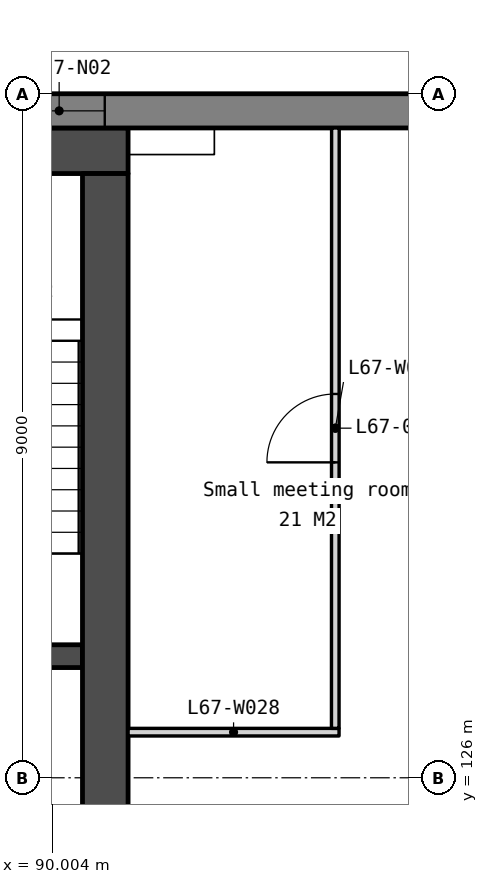
"""IFC4 building model, lengths in metres.
Left out: names, types, materials, properties, quantities, classifications, styles, units other than length and angle.
Written with IfcOpenShell. Run it as: python <this file> out.ifc"""

import sys

from ifc_helpers import new_model, si_unit, direction, frame, frame_2d, origin, place, context, subcontext, project, spatial, polyline, rectangle, outline, extrude, element, fill, save


model = new_model("IFC4")
c1 = context("Model", 3, precision=1e-05, world=origin(), true_north=direction((0.0, 1.0)))
c2 = subcontext(c1, "Body", "Model", "MODEL_VIEW")
j1 = project(units=[si_unit("LENGTHUNIT", "METRE"), si_unit("PLANEANGLEUNIT", "RADIAN")], contexts=[c1])
p1 = place(None, origin())
s1 = spatial("IfcSite", under=j1, at=p1, CompositionType="ELEMENT")
p2 = place(p1, origin())
s2 = spatial("IfcBuilding", under=s1, at=p2, CompositionType="ELEMENT")
p3 = place(p2, frame((0.0, 0.0, 273.8)))
s3 = spatial("IfcBuildingStorey", under=s2, at=p3, CompositionType="ELEMENT", Elevation=273.8)
p4 = place(p3, frame((69.0, 134.25, 0.0), z_axis=(0.0, 0.0, 1.0), x_axis=(1.0, 0.0, 0.0)))
e1 = element("IfcWall", 1, at=p4, inside=s3, PredefinedType="SOLIDWALL", context=c2, shape_type="SweptSolid", body=[
    extrude(rectangle(XDim=22.0, YDim=0.6, at=frame_2d((11.0, 0.0))), origin(), (0.0, 0.0, 1.0), 3.75),
])
p5 = place(p3, frame((87.85, 127.6, 0.0), z_axis=(0.0, 0.0, 1.0), x_axis=(1.0, 0.0, 0.0)))
e2 = element("IfcWall", 2, at=p5, inside=s3, PredefinedType="SOLIDWALL", context=c2, shape_type="SweptSolid", body=[
    extrude(rectangle(XDim=2.55, YDim=0.3, at=frame_2d((1.275, 0.0))), origin(), (0.0, 0.0, 1.0), 3.75),
])
p6 = place(p3, frame((90.7, 133.95, 0.0), z_axis=(0.0, 0.0, 1.0), x_axis=(0.0, -1.0, 0.0)))
e3 = element("IfcWall", 3, at=p6, inside=s3, PredefinedType="SOLIDWALL", context=c2, shape_type="SweptSolid", body=[
    extrude(rectangle(XDim=10.8, YDim=0.6, at=frame_2d((5.4, 0.0))), origin(), (0.0, 0.0, 1.0), 3.75),
])
p7 = place(p3, frame((98.486, 134.775, -0.15), z_axis=(0.0, 0.0, 1.0), x_axis=(-1.0, 0.0, 0.0)))
e4 = element("IfcWall", 4, at=p7, inside=s3, PredefinedType="SOLIDWALL", context=c2, shape_type="SweptSolid", body=[
    extrude(outline(polyline([(36.972, 0.0), (36.972, 3.9), (0.0, 3.9), (0.0, 0.0), (36.972, 0.0)])), frame((0.0, 0.225, 0.0), z_axis=(0.0, -1.0, 0.0), x_axis=(1.0, 0.0, 0.0)), (0.0, 0.0, 1.0), 0.45),
])
p8 = place(p7, frame((0.715, 0.0, 0.95)))
e5 = element("IfcOpeningElement", 5, at=p8, cuts=e4, PredefinedType="OPENING", context=c2, shape_type="SweptSolid", body=[
    extrude(rectangle(XDim=1.2, YDim=2.2, at=frame_2d((0.6, 1.1))), frame((0.0, 0.235, 0.0), z_axis=(0.0, -1.0, 0.0), x_axis=(1.0, 0.0, 0.0)), (0.0, 0.0, 1.0), 0.47),
])
p9 = place(p7, frame((7.793, 0.0, 0.95)))
e6 = element("IfcOpeningElement", 6, at=p9, cuts=e4, PredefinedType="OPENING", context=c2, shape_type="SweptSolid", body=[
    extrude(rectangle(XDim=1.2, YDim=2.2, at=frame_2d((0.6, 1.1))), frame((0.0, 0.235, 0.0), z_axis=(0.0, -1.0, 0.0), x_axis=(1.0, 0.0, 0.0)), (0.0, 0.0, 1.0), 0.47),
])
p10 = place(p7, frame((9.493, 0.0, 0.95)))
e7 = element("IfcOpeningElement", 7, at=p10, cuts=e4, PredefinedType="OPENING", context=c2, shape_type="SweptSolid", body=[
    extrude(rectangle(XDim=1.2, YDim=2.2, at=frame_2d((0.6, 1.1))), frame((0.0, 0.235, 0.0), z_axis=(0.0, -1.0, 0.0), x_axis=(1.0, 0.0, 0.0)), (0.0, 0.0, 1.0), 0.47),
])
p11 = place(p7, frame((17.036, 0.0, 0.95)))
e8 = element("IfcOpeningElement", 8, at=p11, cuts=e4, PredefinedType="OPENING", context=c2, shape_type="SweptSolid", body=[
    extrude(rectangle(XDim=1.2, YDim=2.2, at=frame_2d((0.6, 1.1))), frame((0.0, 0.235, 0.0), z_axis=(0.0, -1.0, 0.0), x_axis=(1.0, 0.0, 0.0)), (0.0, 0.0, 1.0), 0.47),
])
p12 = place(p7, frame((18.736, 0.0, 0.95)))
e9 = element("IfcOpeningElement", 9, at=p12, cuts=e4, PredefinedType="OPENING", context=c2, shape_type="SweptSolid", body=[
    extrude(rectangle(XDim=1.2, YDim=2.2, at=frame_2d((0.6, 1.1))), frame((0.0, 0.235, 0.0), z_axis=(0.0, -1.0, 0.0), x_axis=(1.0, 0.0, 0.0)), (0.0, 0.0, 1.0), 0.47),
])
p13 = place(p7, frame((26.279, 0.0, 0.95)))
e10 = element("IfcOpeningElement", 10, at=p13, cuts=e4, PredefinedType="OPENING", context=c2, shape_type="SweptSolid", body=[
    extrude(rectangle(XDim=1.2, YDim=2.2, at=frame_2d((0.6, 1.1))), frame((0.0, 0.235, 0.0), z_axis=(0.0, -1.0, 0.0), x_axis=(1.0, 0.0, 0.0)), (0.0, 0.0, 1.0), 0.47),
])
p14 = place(p7, frame((27.979, 0.0, 0.95)))
e11 = element("IfcOpeningElement", 11, at=p14, cuts=e4, PredefinedType="OPENING", context=c2, shape_type="SweptSolid", body=[
    extrude(rectangle(XDim=1.2, YDim=2.2, at=frame_2d((0.6, 1.1))), frame((0.0, 0.235, 0.0), z_axis=(0.0, -1.0, 0.0), x_axis=(1.0, 0.0, 0.0)), (0.0, 0.0, 1.0), 0.47),
])
p15 = place(p7, frame((35.058, 0.0, 0.95)))
e12 = element("IfcOpeningElement", 12, at=p15, cuts=e4, PredefinedType="OPENING", context=c2, shape_type="SweptSolid", body=[
    extrude(rectangle(XDim=1.2, YDim=2.2, at=frame_2d((0.6, 1.1))), frame((0.0, 0.235, 0.0), z_axis=(0.0, -1.0, 0.0), x_axis=(1.0, 0.0, 0.0)), (0.0, 0.0, 1.0), 0.47),
])
p16 = place(p3, frame((86.427, 110.752, -0.15), z_axis=(0.0, 0.0, 1.0), x_axis=(0.500000383388, 0.866025182435, 0.0)))
e13 = element("IfcWall", 13, at=p16, inside=s3, PredefinedType="SOLIDWALL", context=c2, shape_type="SweptSolid", body=[
    extrude(outline(polyline([(25.929, 3.9), (25.929, 0.0), (0.0, 0.0), (0.0, 3.9), (25.929, 3.9)])), frame((0.0, 0.225, 0.0), z_axis=(0.0, -1.0, 0.0), x_axis=(1.0, 0.0, 0.0)), (0.0, 0.0, 1.0), 0.45),
])
p17 = place(p16, frame((5.993, 0.0, 0.95)))
e14 = element("IfcOpeningElement", 14, at=p17, cuts=e13, PredefinedType="OPENING", context=c2, shape_type="SweptSolid", body=[
    extrude(rectangle(XDim=1.2, YDim=2.2, at=frame_2d((0.6, 1.1))), frame((0.0, 0.235, 0.0), z_axis=(0.0, -1.0, 0.0), x_axis=(1.0, 0.0, 0.0)), (0.0, 0.0, 1.0), 0.47),
])
p18 = place(p16, frame((7.693, 0.0, 0.95)))
e15 = element("IfcOpeningElement", 15, at=p18, cuts=e13, PredefinedType="OPENING", context=c2, shape_type="SweptSolid", body=[
    extrude(rectangle(XDim=1.2, YDim=2.2, at=frame_2d((0.6, 1.1))), frame((0.0, 0.235, 0.0), z_axis=(0.0, -1.0, 0.0), x_axis=(1.0, 0.0, 0.0)), (0.0, 0.0, 1.0), 0.47),
])
p19 = place(p16, frame((15.236, 0.0, 0.95)))
e16 = element("IfcOpeningElement", 16, at=p19, cuts=e13, PredefinedType="OPENING", context=c2, shape_type="SweptSolid", body=[
    extrude(rectangle(XDim=1.2, YDim=2.2, at=frame_2d((0.6, 1.1))), frame((0.0, 0.235, 0.0), z_axis=(0.0, -1.0, 0.0), x_axis=(1.0, 0.0, 0.0)), (0.0, 0.0, 1.0), 0.47),
])
p20 = place(p16, frame((16.936, 0.0, 0.95)))
e17 = element("IfcOpeningElement", 17, at=p20, cuts=e13, PredefinedType="OPENING", context=c2, shape_type="SweptSolid", body=[
    extrude(rectangle(XDim=1.2, YDim=2.2, at=frame_2d((0.6, 1.1))), frame((0.0, 0.235, 0.0), z_axis=(0.0, -1.0, 0.0), x_axis=(1.0, 0.0, 0.0)), (0.0, 0.0, 1.0), 0.47),
])
p21 = place(p16, frame((24.015, 0.0, 0.95)))
e18 = element("IfcOpeningElement", 18, at=p21, cuts=e13, PredefinedType="OPENING", context=c2, shape_type="SweptSolid", body=[
    extrude(rectangle(XDim=1.2, YDim=2.2, at=frame_2d((0.6, 1.1))), frame((0.0, 0.235, 0.0), z_axis=(0.0, -1.0, 0.0), x_axis=(1.0, 0.0, 0.0)), (0.0, 0.0, 1.0), 0.47),
])
p22 = place(p3, frame((91.0, 126.6, 0.0), z_axis=(0.0, 0.0, 1.0), x_axis=(1.0, 0.0, 0.0)))
e19 = element("IfcWall", 19, at=p22, inside=s3, PredefinedType="PARTITIONING", context=c2, shape_type="SweptSolid", body=[
    extrude(rectangle(XDim=2.776, YDim=0.1, at=frame_2d((1.388, 0.0))), origin(), (0.0, 0.0, 1.0), 3.75),
])
p23 = place(p3, frame((93.726, 126.65, 0.0), z_axis=(0.0, 0.0, 1.0), x_axis=(0.000278129721, 0.999999961322, 0.0)))
e20 = element("IfcWall", 20, at=p23, inside=s3, PredefinedType="PARTITIONING", context=c2, shape_type="SweptSolid", body=[
    extrude(rectangle(XDim=7.9, YDim=0.1, at=frame_2d((3.95, 0.0))), origin(), (0.0, 0.0, 1.0), 3.75),
])
p24 = place(p23, frame((3.5, 0.0, 0.0)))
e21 = element("IfcOpeningElement", 21, at=p24, cuts=e20, PredefinedType="OPENING", context=c2, shape_type="SweptSolid", body=[
    extrude(rectangle(XDim=0.9, YDim=2.1, at=frame_2d((0.45, 1.05))), frame((0.0, 0.06, 0.0), z_axis=(0.0, -1.0, 0.0), x_axis=(1.0, 0.0, 0.0)), (0.0, 0.0, 1.0), 0.12),
])
p25 = place(p9, origin())
e22 = element("IfcWindow", 22, at=p25, inside=s3, PartitioningType="SINGLE_PANEL", PredefinedType="WINDOW", context=c2, shape_type="SweptSolid", body=[
    extrude(rectangle(XDim=1.2, YDim=2.2, at=frame_2d((0.6, 1.1))), frame((0.0, 0.03, 0.0), z_axis=(0.0, -1.0, 0.0), x_axis=(1.0, 0.0, 0.0)), (0.0, 0.0, 1.0), 0.06),
])
fill(e6, e22)
p26 = place(p24, origin())
e23 = element("IfcDoor", 23, at=p26, inside=s3, OperationType="SINGLE_SWING_LEFT", PredefinedType="DOOR", context=c2, shape_type="SweptSolid", body=[
    extrude(rectangle(XDim=0.9, YDim=2.1, at=frame_2d((0.45, 1.05))), frame((0.0, 0.025, 0.0), z_axis=(0.0, -1.0, 0.0), x_axis=(1.0, 0.0, 0.0)), (0.0, 0.0, 1.0), 0.05),
])
fill(e21, e23)
save(model, sys.argv[1])
